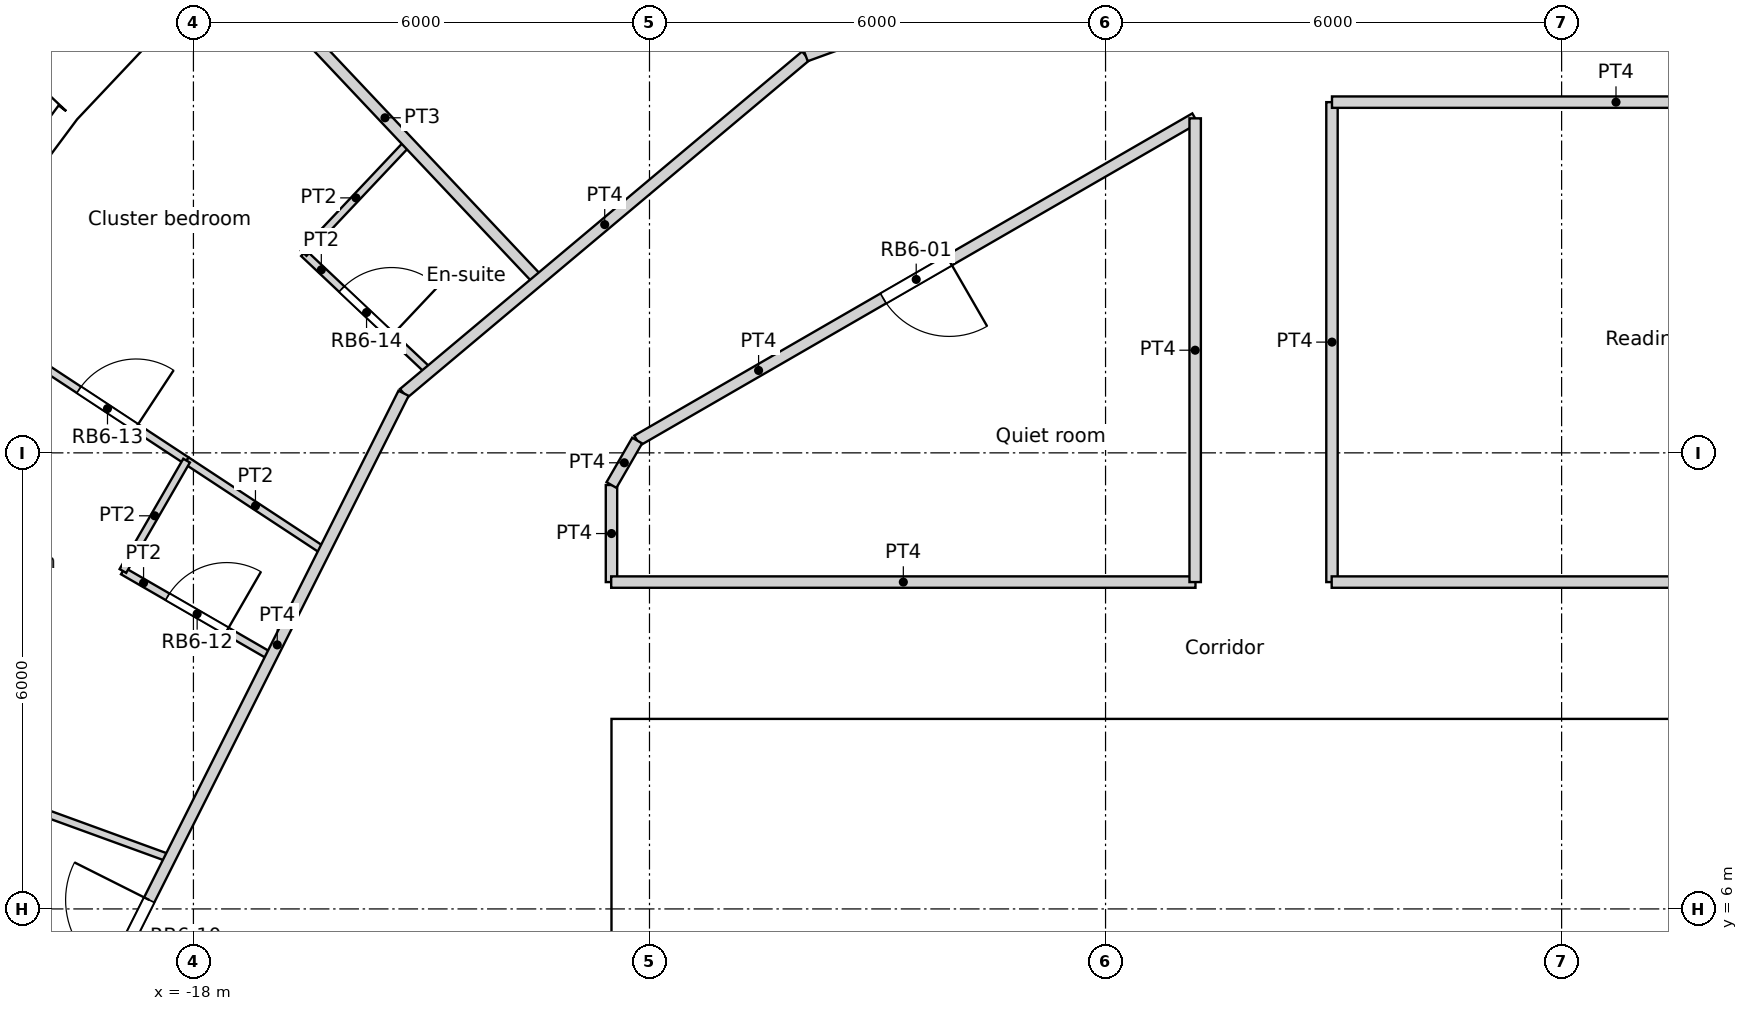
"""IFC4 building model, lengths in metres.
Left out: names, types, materials, properties, quantities, classifications, styles, units other than length and angle.
Written with IfcOpenShell. Run it as: python <this file> out.ifc"""

import sys

from ifc_helpers import new_model, si_unit, direction, frame, frame_2d, origin, origin_2d, place, context, subcontext, project, spatial, rectangle, circle, extrude, element, fill, save


model = new_model("IFC4")
c1 = context("Model", 3, precision=1e-05, world=origin(), true_north=direction((0.0, 1.0)))
c2 = subcontext(c1, "Body", "Model", "MODEL_VIEW")
j1 = project(units=[si_unit("LENGTHUNIT", "METRE"), si_unit("PLANEANGLEUNIT", "RADIAN")], contexts=[c1])
p1 = place(None, origin())
s1 = spatial("IfcSite", under=j1, at=p1, CompositionType="ELEMENT")
p2 = place(p1, origin())
s2 = spatial("IfcBuilding", under=s1, at=p2, CompositionType="ELEMENT")
p3 = place(p2, frame((0.0, 0.0, 180.0)))
s3 = spatial("IfcBuildingStorey", under=s2, at=p3, CompositionType="ELEMENT", Elevation=180.0)
p4 = place(p3, frame((-16.846, 17.855, 0.0), z_axis=(0.0, 0.0, 1.0), x_axis=(1.0, 0.0, 0.0)))
e1 = element("IfcColumn", 1, at=p4, inside=s3, PredefinedType="COLUMN", context=c2, shape_type="SweptSolid", body=[
    extrude(circle(Radius=0.6, at=origin_2d()), origin(), (0.0, 0.0, 1.0), 3.6),
])
for number, where, z_axis, x_axis in (
    (2, (-9.411, 16.301, 0.0), (0.0, 0.0, 1.0), (1.0, 0.0, 0.0)),
    (3, (-13.798, 12.802, 0.0), (0.0, 0.0, 1.0), (1.0, 0.0, 0.0)),
    (4, (-16.958, 8.167, 0.0), (0.0, 0.0, 1.0), (1.0, 0.0, 0.0)),
):
    element("IfcColumn", number, at=place(p3, frame(where, z_axis=z_axis, x_axis=x_axis)), inside=s3, PredefinedType="COLUMN", context=c2, shape_type="SweptSolid", body=[
        extrude(circle(Radius=0.65, at=origin_2d()), origin(), (0.0, 0.0, 1.0), 3.6),
    ])
p5 = place(p3, frame((-18.013, 19.056, -0.3), z_axis=(0.0, 0.0, 1.0), x_axis=(-0.686217177108, -0.727396718334, 0.0)))
e5 = element("IfcWall", 5, at=p5, inside=s3, PredefinedType="ELEMENTEDWALL", context=c2, shape_type="SweptSolid", body=[
    extrude(rectangle(XDim=3.0, YDim=1.45, at=frame_2d((1.5, 0.0))), origin(), (0.0, 0.0, 1.0), 3.6),
])
p6 = place(p5, frame((1.5, 0.0, 1.85)))
e6 = element("IfcOpeningElement", 6, at=p6, cuts=e5, PredefinedType="OPENING", context=c2, shape_type="SweptSolid", body=[
    extrude(circle(Radius=0.9, at=origin_2d()), frame((0.0, 0.735, 0.0), z_axis=(0.0, -1.0, 0.0), x_axis=(1.0, 0.0, 0.0)), (0.0, 0.0, 1.0), 1.47),
])
p7 = place(p3, frame((-19.653, 16.478, 0.0), z_axis=(0.0, 0.0, 1.0), x_axis=(-0.597197580538, -0.80209416517, 0.0)))
e7 = element("IfcWall", 7, at=p7, inside=s3, PredefinedType="SOLIDWALL", context=c2, shape_type="SweptSolid", body=[
    extrude(rectangle(XDim=2.973, YDim=0.3, at=frame_2d((1.486, 0.0))), origin(), (0.0, 0.0, 1.0), 3.3),
])
p8 = place(p7, frame((1.486, 0.0, 1.55)))
e8 = element("IfcOpeningElement", 8, at=p8, cuts=e7, PredefinedType="OPENING", context=c2, shape_type="SweptSolid", body=[
    extrude(circle(Radius=0.9, at=origin_2d()), frame((0.0, 0.16, 0.0), z_axis=(0.0, -1.0, 0.0), x_axis=(1.0, 0.0, 0.0)), (0.0, 0.0, 1.0), 0.32),
])
p9 = place(p3, frame((-12.5, 8.05, 0.0), z_axis=(0.0, 0.0, 1.0), x_axis=(1.0, 0.0, 0.0)))
e9 = element("IfcWall", 9, at=p9, inside=s3, PredefinedType="SOLIDWALL", context=c2, shape_type="SweptSolid", body=[
    extrude(rectangle(XDim=25.0, YDim=0.9, at=frame_2d((12.5, 0.0))), origin(), (0.0, 0.0, 1.0), 3.6),
])
p10 = place(p9, frame((8.3, 0.0, 0.0)))
e10 = element("IfcOpeningElement", 10, at=p10, cuts=e9, PredefinedType="OPENING", context=c2, shape_type="SweptSolid", body=[
    extrude(rectangle(XDim=1.8, YDim=2.1, at=frame_2d((0.9, 1.05))), frame((0.0, 0.45, 0.0), z_axis=(0.0, -1.0, 0.0), x_axis=(1.0, 0.0, 0.0)), (0.0, 0.0, 1.0), 0.9),
])
p11 = place(p3, frame((-12.05, -7.6, 0.0), z_axis=(0.0, 0.0, 1.0), x_axis=(0.0, 1.0, 0.0)))
e11 = element("IfcWall", 11, at=p11, inside=s3, PredefinedType="SOLIDWALL", context=c2, shape_type="SweptSolid", body=[
    extrude(rectangle(XDim=15.2, YDim=0.9, at=frame_2d((7.6, 0.0))), origin(), (0.0, 0.0, 1.0), 3.6),
])
p12 = place(p11, frame((7.1, 0.0, 0.0)))
e12 = element("IfcOpeningElement", 12, at=p12, cuts=e11, PredefinedType="OPENING", context=c2, shape_type="SweptSolid", body=[
    extrude(rectangle(XDim=1.0, YDim=2.1, at=frame_2d((0.5, 1.05))), frame((0.0, 0.45, 0.0), z_axis=(0.0, -1.0, 0.0), x_axis=(1.0, 0.0, 0.0)), (0.0, 0.0, 1.0), 0.9),
])
for number, where, z_axis, x_axis in (
    (13, (-2.25, 3.25, 0.0), (0.0, 0.0, 1.0), (0.0, 1.0, 0.0)),
    (14, (0.55, 3.25, 0.0), (0.0, 0.0, 1.0), (0.0, 1.0, 0.0)),
):
    element("IfcWall", number, at=place(p3, frame(where, z_axis=z_axis, x_axis=x_axis)), inside=s3, PredefinedType="SOLIDWALL", context=c2, shape_type="SweptSolid", body=[
        extrude(rectangle(XDim=4.35, YDim=0.3, at=frame_2d((2.175, 0.0))), origin(), (0.0, 0.0, 1.0), 3.3),
    ])
p13 = place(p3, frame((-9.05, -7.0, 0.0), z_axis=(0.0, 0.0, 1.0), x_axis=(0.0, 1.0, 0.0)))
e15 = element("IfcWall", 15, at=p13, inside=s3, PredefinedType="SOLIDWALL", context=c2, shape_type="SweptSolid", body=[
    extrude(rectangle(XDim=14.6, YDim=0.3, at=frame_2d((7.3, 0.0))), origin(), (0.0, 0.0, 1.0), 3.3),
])
p14 = place(p3, frame((-8.9, 6.55, 0.0), z_axis=(0.0, 0.0, 1.0), x_axis=(1.0, 0.0, 0.0)))
e16 = element("IfcWall", 16, at=p14, inside=s3, PredefinedType="SOLIDWALL", context=c2, shape_type="SweptSolid", body=[
    extrude(rectangle(XDim=4.7, YDim=0.3, at=frame_2d((2.35, 0.0))), origin(), (0.0, 0.0, 1.0), 3.3),
])
p15 = place(p3, frame((-4.275, 6.7, 0.0), z_axis=(0.0, 0.0, 1.0), x_axis=(0.0, 1.0, 0.0)))
e17 = element("IfcWall", 17, at=p15, inside=s3, PredefinedType="SOLIDWALL", context=c2, shape_type="SweptSolid", body=[
    extrude(rectangle(XDim=0.9, YDim=0.15, at=frame_2d((0.45, 0.0))), origin(), (0.0, 0.0, 1.0), 3.3),
])
p16 = place(p3, frame((-4.2, 6.55, 0.0), z_axis=(0.0, 0.0, 1.0), x_axis=(1.0, 0.0, 0.0)))
e18 = element("IfcWall", 18, at=p16, inside=s3, PredefinedType="SOLIDWALL", context=c2, shape_type="SweptSolid", body=[
    extrude(rectangle(XDim=1.8, YDim=0.3, at=frame_2d((0.9, 0.0))), origin(), (0.0, 0.0, 1.0), 3.3),
])
p17 = place(p16, frame((0.05, 0.0, 0.0)))
e19 = element("IfcOpeningElement", 19, at=p17, cuts=e18, PredefinedType="OPENING", context=c2, shape_type="SweptSolid", body=[
    extrude(rectangle(XDim=1.7, YDim=2.1, at=frame_2d((0.85, 1.05))), frame((0.0, 0.15, 0.0), z_axis=(0.0, -1.0, 0.0), x_axis=(1.0, 0.0, 0.0)), (0.0, 0.0, 1.0), 0.3),
])
p18 = place(p3, frame((-2.1, 6.55, 0.0), z_axis=(0.0, 0.0, 1.0), x_axis=(1.0, 0.0, 0.0)))
e20 = element("IfcWall", 20, at=p18, inside=s3, PredefinedType="SOLIDWALL", context=c2, shape_type="SweptSolid", body=[
    extrude(rectangle(XDim=2.65, YDim=0.3, at=frame_2d((1.325, 0.0))), origin(), (0.0, 0.0, 1.0), 3.3),
])
p19 = place(p3, frame((0.7, 7.15, 0.0), z_axis=(0.0, 0.0, 1.0), x_axis=(1.0, 0.0, 0.0)))
e21 = element("IfcWall", 21, at=p19, inside=s3, PredefinedType="SOLIDWALL", context=c2, shape_type="SweptSolid", body=[
    extrude(rectangle(XDim=8.35, YDim=0.9, at=frame_2d((4.175, 0.0))), origin(), (0.0, 0.0, 1.0), 3.3),
])
p20 = place(p3, frame((0.55, 6.55, 0.0), z_axis=(0.0, 0.0, 1.0), x_axis=(1.0, 0.0, 0.0)))
e22 = element("IfcWall", 22, at=p20, inside=s3, PredefinedType="SOLIDWALL", context=c2, shape_type="SweptSolid", body=[
    extrude(rectangle(XDim=8.35, YDim=0.3, at=frame_2d((4.175, 0.0))), origin(), (0.0, 0.0, 1.0), 3.3),
])
p21 = place(p3, frame((-12.504, 10.3, 0.0), z_axis=(0.0, 0.0, 1.0), x_axis=(1.0, 0.0, 0.0)))
e23 = element("IfcWall", 23, at=p21, inside=s3, PredefinedType="PARTITIONING", context=c2, shape_type="SweptSolid", body=[
    extrude(rectangle(XDim=7.687, YDim=0.15, at=frame_2d((3.844, 0.0))), origin(), (0.0, 0.0, 1.0), 3.3),
])
p22 = place(p3, frame((-3.025, 10.3, 0.0), z_axis=(0.0, 0.0, 1.0), x_axis=(1.0, 0.0, 0.0)))
e24 = element("IfcWall", 24, at=p22, inside=s3, PredefinedType="PARTITIONING", context=c2, shape_type="SweptSolid", body=[
    extrude(rectangle(XDim=16.262, YDim=0.15, at=frame_2d((8.131, 0.0))), origin(), (0.0, 0.0, 1.0), 3.3),
])
p23 = place(p22, frame((7.263, 0.0, 0.0)))
e25 = element("IfcOpeningElement", 25, at=p23, cuts=e24, PredefinedType="OPENING", context=c2, shape_type="SweptSolid", body=[
    extrude(rectangle(XDim=1.0, YDim=2.04, at=frame_2d((0.5, 1.02))), frame((0.0, 0.075, 0.0), z_axis=(0.0, -1.0, 0.0), x_axis=(1.0, 0.0, 0.0)), (0.0, 0.0, 1.0), 0.15),
])
p24 = place(p3, frame((-4.821, 10.3, 0.0), z_axis=(0.0, 0.0, 1.0), x_axis=(0.0, 1.0, 0.0)))
e26 = element("IfcWall", 26, at=p24, inside=s3, PredefinedType="PARTITIONING", context=c2, shape_type="SweptSolid", body=[
    extrude(rectangle(XDim=6.101, YDim=0.15, at=frame_2d((3.05, 0.0))), origin(), (0.0, 0.0, 1.0), 3.3),
])
p25 = place(p3, frame((-12.162, 12.162, 0.0), z_axis=(0.0, 0.0, 1.0), x_axis=(0.866004766557, 0.500035743023, 0.0)))
e27 = element("IfcWall", 27, at=p25, inside=s3, PredefinedType="PARTITIONING", context=c2, shape_type="SweptSolid", body=[
    extrude(rectangle(XDim=8.477, YDim=0.15, at=frame_2d((4.239, 0.0))), origin(), (0.0, 0.0, 1.0), 3.3),
])
p26 = place(p25, frame((3.739, 0.0, 0.0)))
e28 = element("IfcOpeningElement", 28, at=p26, cuts=e27, PredefinedType="OPENING", context=c2, shape_type="SweptSolid", body=[
    extrude(rectangle(XDim=1.0, YDim=2.04, at=frame_2d((0.5, 1.02))), frame((0.0, 0.075, 0.0), z_axis=(0.0, -1.0, 0.0), x_axis=(1.0, 0.0, 0.0)), (0.0, 0.0, 1.0), 0.15),
])
p27 = place(p3, frame((-3.021, 16.614, 0.0), z_axis=(0.0, 0.0, 1.0), x_axis=(1.0, 0.0, 0.0)))
e29 = element("IfcWall", 29, at=p27, inside=s3, PredefinedType="PARTITIONING", context=c2, shape_type="SweptSolid", body=[
    extrude(rectangle(XDim=7.473, YDim=0.15, at=frame_2d((3.736, 0.0))), origin(), (0.0, 0.0, 1.0), 3.3),
])
p28 = place(p3, frame((-3.021, 10.3, 0.0), z_axis=(0.0, 0.0, 1.0), x_axis=(0.0, 1.0, 0.0)))
e30 = element("IfcWall", 30, at=p28, inside=s3, PredefinedType="PARTITIONING", context=c2, shape_type="SweptSolid", body=[
    extrude(rectangle(XDim=6.314, YDim=0.15, at=frame_2d((3.157, 0.0))), origin(), (0.0, 0.0, 1.0), 3.3),
])
p29 = place(p3, frame((-15.234, 12.783, 0.0), z_axis=(0.0, 0.0, 1.0), x_axis=(0.765968036922, 0.642878656058, 0.0)))
e31 = element("IfcWall", 31, at=p29, inside=s3, PredefinedType="PARTITIONING", context=c2, shape_type="SweptSolid", body=[
    extrude(rectangle(XDim=6.906, YDim=0.15, at=frame_2d((3.453, 0.0))), origin(), (0.0, 0.0, 1.0), 3.3),
])
p30 = place(p3, frame((-9.944, 17.223, 0.0), z_axis=(0.0, 0.0, 1.0), x_axis=(0.939672634566, 0.342075050021, 0.0)))
e32 = element("IfcWall", 32, at=p30, inside=s3, PredefinedType="PARTITIONING", context=c2, shape_type="SweptSolid", body=[
    extrude(rectangle(XDim=6.908, YDim=0.15, at=frame_2d((3.454, 0.0))), origin(), (0.0, 0.0, 1.0), 3.3),
])
p31 = place(p30, frame((2.954, 0.0, 0.0)))
e33 = element("IfcOpeningElement", 33, at=p31, cuts=e32, PredefinedType="OPENING", context=c2, shape_type="SweptSolid", body=[
    extrude(rectangle(XDim=1.0, YDim=2.04, at=frame_2d((0.5, 1.02))), frame((0.0, 0.075, 0.0), z_axis=(0.0, -1.0, 0.0), x_axis=(1.0, 0.0, 0.0)), (0.0, 0.0, 1.0), 0.15),
])
p32 = place(p3, frame((-12.5, 11.577, 0.0), z_axis=(0.0, 0.0, 1.0), x_axis=(0.500024767483, 0.866011103799, 0.0)))
e34 = element("IfcWall", 34, at=p32, inside=s3, PredefinedType="PARTITIONING", context=c2, shape_type="SweptSolid", body=[
    extrude(rectangle(XDim=0.676, YDim=0.15, at=frame_2d((0.338, 0.0))), origin(), (0.0, 0.0, 1.0), 3.3),
])
p33 = place(p3, frame((-12.5, 10.3, 0.0), z_axis=(0.0, 0.0, 1.0), x_axis=(0.0, 1.0, 0.0)))
e35 = element("IfcWall", 35, at=p33, inside=s3, PredefinedType="PARTITIONING", context=c2, shape_type="SweptSolid", body=[
    extrude(rectangle(XDim=1.277, YDim=0.15, at=frame_2d((0.638, 0.0))), origin(), (0.0, 0.0, 1.0), 3.3),
])
p34 = place(p3, frame((-19.351, 4.586, 0.0), z_axis=(0.0, 0.0, 1.0), x_axis=(0.44867140262, 0.893696801198, 0.0)))
e36 = element("IfcWall", 36, at=p34, inside=s3, PredefinedType="PARTITIONING", context=c2, shape_type="SweptSolid", body=[
    extrude(rectangle(XDim=9.174, YDim=0.15, at=frame_2d((4.587, 0.0))), origin(), (0.0, 0.0, 1.0), 3.3),
])
p35 = place(p34, frame((0.615, 0.0, 0.0)))
e37 = element("IfcOpeningElement", 37, at=p35, cuts=e36, PredefinedType="OPENING", context=c2, shape_type="SweptSolid", body=[
    extrude(rectangle(XDim=1.1, YDim=2.1, at=frame_2d((0.55, 1.05))), frame((0.0, 0.075, 0.0), z_axis=(0.0, -1.0, 0.0), x_axis=(1.0, 0.0, 0.0)), (0.0, 0.0, 1.0), 0.15),
])
p36 = place(p3, frame((-17.497, 18.546, 0.0), z_axis=(0.0, 0.0, 1.0), x_axis=(0.68633567779, -0.727284907991, 0.0)))
e38 = element("IfcWall", 38, at=p36, inside=s3, PredefinedType="PARTITIONING", context=c2, shape_type="SweptSolid", body=[
    extrude(rectangle(XDim=5.879, YDim=0.15, at=frame_2d((2.939, 0.0))), origin(), (0.0, 0.0, 1.0), 3.3),
])
p37 = place(p3, frame((-23.96, 8.721, 0.0), z_axis=(0.0, 0.0, 1.0), x_axis=(0.939704504136, -0.341987492326, 0.0)))
e39 = element("IfcWall", 39, at=p37, inside=s3, PredefinedType="PARTITIONING", context=c2, shape_type="SweptSolid", body=[
    extrude(rectangle(XDim=6.014, YDim=0.1, at=frame_2d((3.007, 0.0))), origin(), (0.0, 0.0, 1.0), 3.3),
])
p38 = place(p37, frame((2.508, 0.0, 0.0)))
e40 = element("IfcOpeningElement", 40, at=p38, cuts=e39, PredefinedType="OPENING", context=c2, shape_type="SweptSolid", body=[
    extrude(rectangle(XDim=1.0, YDim=2.04, at=frame_2d((0.5, 1.02))), frame((0.0, 0.05, 0.0), z_axis=(0.0, -1.0, 0.0), x_axis=(1.0, 0.0, 0.0)), (0.0, 0.0, 1.0), 0.1),
])
p39 = place(p3, frame((-18.928, 10.446, 0.0), z_axis=(0.0, 0.0, 1.0), x_axis=(0.499835922194, 0.866120113428, 0.0)))
e41 = element("IfcWall", 41, at=p39, inside=s3, PredefinedType="PARTITIONING", context=c2, shape_type="SweptSolid", body=[
    extrude(rectangle(XDim=1.676, YDim=0.1, at=frame_2d((0.838, 0.0))), origin(), (0.0, 0.0, 1.0), 3.3),
])
p40 = place(p3, frame((-18.928, 10.446, 0.0), z_axis=(0.0, 0.0, 1.0), x_axis=(0.865942177038, -0.500144125255, 0.0)))
e42 = element("IfcWall", 42, at=p40, inside=s3, PredefinedType="PARTITIONING", context=c2, shape_type="SweptSolid", body=[
    extrude(rectangle(XDim=2.255, YDim=0.1, at=frame_2d((1.127, 0.0))), origin(), (0.0, 0.0, 1.0), 3.3),
])
p41 = place(p40, frame((0.678, 0.0, 0.0)))
e43 = element("IfcOpeningElement", 43, at=p41, cuts=e42, PredefinedType="OPENING", context=c2, shape_type="SweptSolid", body=[
    extrude(rectangle(XDim=0.9, YDim=2.0, at=frame_2d((0.45, 1.0))), frame((0.0, 0.05, 0.0), z_axis=(0.0, -1.0, 0.0), x_axis=(1.0, 0.0, 0.0)), (0.0, 0.0, 1.0), 0.1),
])
p42 = place(p3, frame((-21.303, 14.011, 0.0), z_axis=(0.0, 0.0, 1.0), x_axis=(0.835501457061, -0.549488230309, 0.0)))
e44 = element("IfcWall", 44, at=p42, inside=s3, PredefinedType="PARTITIONING", context=c2, shape_type="SweptSolid", body=[
    extrude(rectangle(XDim=3.845, YDim=0.1, at=frame_2d((1.923, 0.0))), origin(), (0.0, 0.0, 1.0), 3.3),
])
p43 = place(p42, frame((2.15, 0.0, 0.0)))
e45 = element("IfcOpeningElement", 45, at=p43, cuts=e44, PredefinedType="OPENING", context=c2, shape_type="SweptSolid", body=[
    extrude(rectangle(XDim=0.9, YDim=2.1, at=frame_2d((0.45, 1.05))), frame((0.0, 0.05, 0.0), z_axis=(0.0, -1.0, 0.0), x_axis=(1.0, 0.0, 0.0)), (0.0, 0.0, 1.0), 0.1),
])
p44 = place(p3, frame((-24.81, 5.88, 0.0), z_axis=(0.0, 0.0, 1.0), x_axis=(0.973029918752, -0.230678948353, 0.0)))
e46 = element("IfcWall", 46, at=p44, inside=s3, PredefinedType="PARTITIONING", context=c2, shape_type="SweptSolid", body=[
    extrude(rectangle(XDim=5.609, YDim=0.1, at=frame_2d((2.805, 0.0))), origin(), (0.0, 0.0, 1.0), 3.3),
])
p45 = place(p44, frame((2.139, 0.0, 0.0)))
e47 = element("IfcOpeningElement", 47, at=p45, cuts=e46, PredefinedType="OPENING", context=c2, shape_type="SweptSolid", body=[
    extrude(rectangle(XDim=0.9, YDim=2.1, at=frame_2d((0.45, 1.05))), frame((0.0, 0.05, 0.0), z_axis=(0.0, -1.0, 0.0), x_axis=(1.0, 0.0, 0.0)), (0.0, 0.0, 1.0), 0.1),
])
p46 = place(p3, frame((-18.09, 11.898, 0.0), z_axis=(0.0, 0.0, 1.0), x_axis=(0.835463324296, -0.549546207116, 0.0)))
e48 = element("IfcWall", 48, at=p46, inside=s3, PredefinedType="PARTITIONING", context=c2, shape_type="SweptSolid", body=[
    extrude(rectangle(XDim=2.169, YDim=0.1, at=frame_2d((1.084, 0.0))), origin(), (0.0, 0.0, 1.0), 3.3),
])
p47 = place(p3, frame((-16.549, 14.626, 0.0), z_axis=(0.0, 0.0, 1.0), x_axis=(0.686337209023, 0.727283462971, 0.0)))
e49 = element("IfcWall", 49, at=p47, inside=s3, PredefinedType="PARTITIONING", context=c2, shape_type="SweptSolid", body=[
    extrude(rectangle(XDim=2.003, YDim=0.1, at=frame_2d((1.002, 0.0))), origin(), (0.0, 0.0, 1.0), 3.3),
])
p48 = place(p3, frame((-16.549, 14.626, 0.0), z_axis=(0.0, 0.0, 1.0), x_axis=(0.727754926423, -0.68583727448, 0.0)))
e50 = element("IfcWall", 50, at=p48, inside=s3, PredefinedType="PARTITIONING", context=c2, shape_type="SweptSolid", body=[
    extrude(rectangle(XDim=2.271, YDim=0.1, at=frame_2d((1.136, 0.0))), origin(), (0.0, 0.0, 1.0), 3.3),
])
p49 = place(p48, frame((0.686, 0.0, 0.0)))
e51 = element("IfcOpeningElement", 51, at=p49, cuts=e50, PredefinedType="OPENING", context=c2, shape_type="SweptSolid", body=[
    extrude(rectangle(XDim=0.9, YDim=2.04, at=frame_2d((0.45, 1.02))), frame((0.0, 0.05, 0.0), z_axis=(0.0, -1.0, 0.0), x_axis=(1.0, 0.0, 0.0)), (0.0, 0.0, 1.0), 0.1),
])
p50 = place(p6, origin())
e52 = element("IfcWindow", 52, at=p50, inside=s3, PartitioningType="SINGLE_PANEL", PredefinedType="WINDOW", context=c2, shape_type="SweptSolid", body=[
    extrude(circle(Radius=0.9, at=origin_2d()), frame((0.0, 0.695, 0.0), z_axis=(0.0, -1.0, 0.0), x_axis=(1.0, 0.0, 0.0)), (0.0, 0.0, 1.0), 0.1),
])
fill(e6, e52)
p51 = place(p17, origin())
e53 = element("IfcDoor", 53, at=p51, inside=s3, OperationType="DOUBLE_DOOR_SINGLE_SWING", PredefinedType="DOOR", context=c2, shape_type="SweptSolid", body=[
    extrude(rectangle(XDim=1.7, YDim=2.1, at=frame_2d((0.85, 1.05))), frame((0.0, 0.025, 0.0), z_axis=(0.0, -1.0, 0.0), x_axis=(1.0, 0.0, 0.0)), (0.0, 0.0, 1.0), 0.05),
])
fill(e19, e53)
p52 = place(p10, origin())
e54 = element("IfcDoor", 54, at=p52, inside=s3, OperationType="DOUBLE_DOOR_SINGLE_SWING", PredefinedType="DOOR", context=c2, shape_type="SweptSolid", body=[
    extrude(rectangle(XDim=1.8, YDim=2.1, at=frame_2d((0.9, 1.05))), frame((0.0, 0.025, 0.0), z_axis=(0.0, -1.0, 0.0), x_axis=(1.0, 0.0, 0.0)), (0.0, 0.0, 1.0), 0.05),
])
fill(e10, e54)
p53 = place(p26, origin())
e55 = element("IfcDoor", 55, at=p53, inside=s3, OperationType="SINGLE_SWING_LEFT", PredefinedType="DOOR", context=c2, shape_type="SweptSolid", body=[
    extrude(rectangle(XDim=1.0, YDim=2.04, at=frame_2d((0.5, 1.02))), frame((0.0, 0.025, 0.0), z_axis=(0.0, -1.0, 0.0), x_axis=(1.0, 0.0, 0.0)), (0.0, 0.0, 1.0), 0.05),
])
fill(e28, e55)
p54 = place(p35, origin())
e56 = element("IfcDoor", 56, at=p54, inside=s3, OperationType="SINGLE_SWING_RIGHT", PredefinedType="DOOR", context=c2, shape_type="SweptSolid", body=[
    extrude(rectangle(XDim=1.1, YDim=2.1, at=frame_2d((0.55, 1.05))), frame((0.0, 0.025, 0.0), z_axis=(0.0, -1.0, 0.0), x_axis=(1.0, 0.0, 0.0)), (0.0, 0.0, 1.0), 0.05),
])
fill(e37, e56)
p55 = place(p41, origin())
e57 = element("IfcDoor", 57, at=p55, inside=s3, OperationType="SINGLE_SWING_RIGHT", PredefinedType="DOOR", context=c2, shape_type="SweptSolid", body=[
    extrude(rectangle(XDim=0.9, YDim=2.0, at=frame_2d((0.45, 1.0))), frame((0.0, 0.025, 0.0), z_axis=(0.0, -1.0, 0.0), x_axis=(1.0, 0.0, 0.0)), (0.0, 0.0, 1.0), 0.05),
])
fill(e43, e57)
p56 = place(p43, origin())
e58 = element("IfcDoor", 58, at=p56, inside=s3, OperationType="SINGLE_SWING_RIGHT", PredefinedType="DOOR", context=c2, shape_type="SweptSolid", body=[
    extrude(rectangle(XDim=0.9, YDim=2.1, at=frame_2d((0.45, 1.05))), frame((0.0, 0.025, 0.0), z_axis=(0.0, -1.0, 0.0), x_axis=(1.0, 0.0, 0.0)), (0.0, 0.0, 1.0), 0.05),
])
fill(e45, e58)
p57 = place(p49, origin())
e59 = element("IfcDoor", 59, at=p57, inside=s3, OperationType="SINGLE_SWING_RIGHT", PredefinedType="DOOR", context=c2, shape_type="SweptSolid", body=[
    extrude(rectangle(XDim=0.9, YDim=2.04, at=frame_2d((0.45, 1.02))), frame((0.0, 0.025, 0.0), z_axis=(0.0, -1.0, 0.0), x_axis=(1.0, 0.0, 0.0)), (0.0, 0.0, 1.0), 0.05),
])
fill(e51, e59)
save(model, sys.argv[1])
